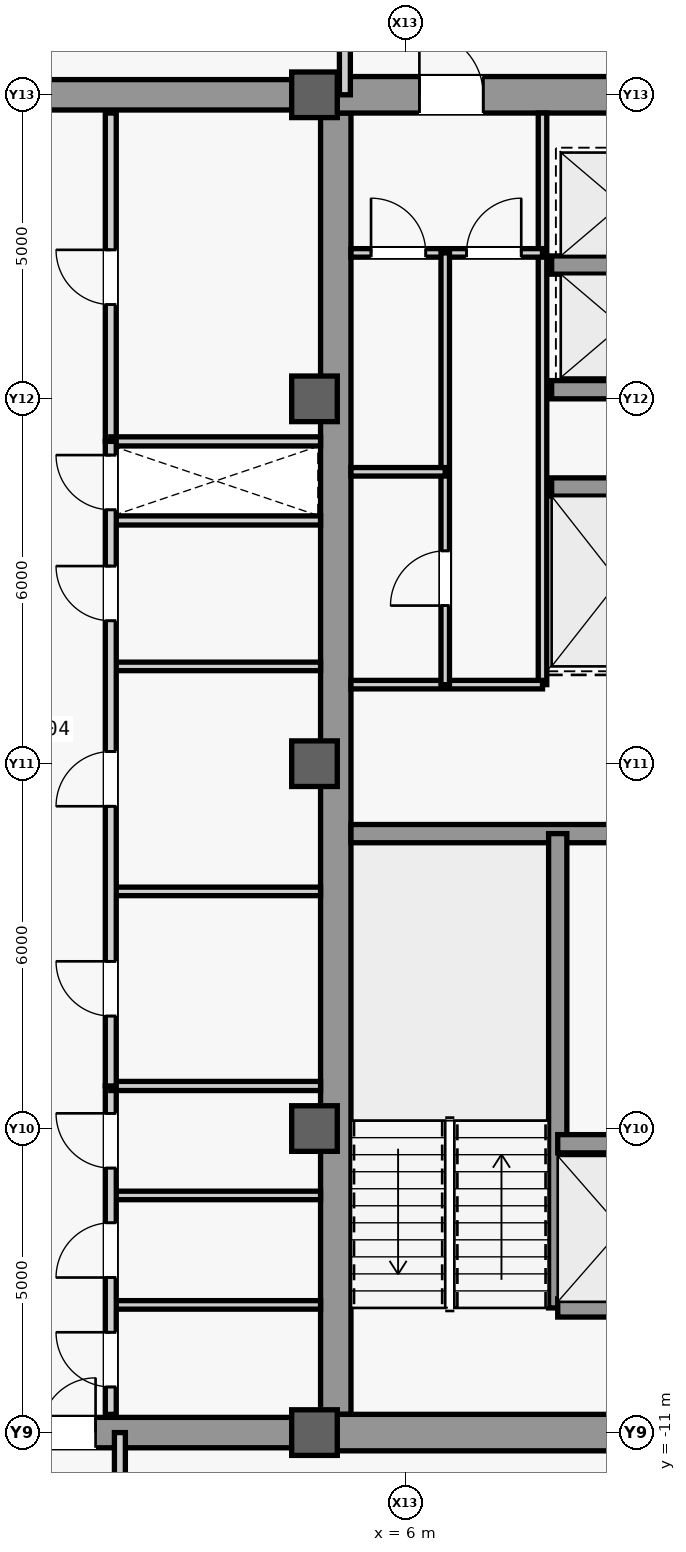
"""IFC4 building model, lengths in metres.
Left out: names, types, materials, properties, quantities, classifications, styles, units other than length and angle.
Written with IfcOpenShell. Run it as: python <this file> out.ifc"""

import sys

from ifc_helpers import new_model, si_unit, direction, frame, frame_2d, origin, origin_2d, place, context, subcontext, project, spatial, rectangle, extrude, source, transform, mapped, element, fill, save


model = new_model("IFC4")
c1 = context("Model", 3, precision=1e-05, world=origin(), true_north=direction((0.0, 1.0)))
c2 = subcontext(c1, "Body", "Model", "MODEL_VIEW")
j1 = project(units=[si_unit("LENGTHUNIT", "METRE"), si_unit("PLANEANGLEUNIT", "RADIAN")], contexts=[c1])
p1 = place(None, origin())
s1 = spatial("IfcSite", under=j1, at=p1, CompositionType="ELEMENT")
p2 = place(p1, origin())
s2 = spatial("IfcBuilding", under=s1, at=p2, CompositionType="ELEMENT")
p3 = place(p2, frame((0.0, 0.0, 273.5)))
s3 = spatial("IfcBuildingStorey", under=s2, at=p3, CompositionType="ELEMENT", Elevation=273.5)
m1 = source(origin(), c2, "Body", "SweptSolid", [
    extrude(rectangle(XDim=21.4, YDim=0.5, at=frame_2d((10.7, 0.0))), origin(), (0.0, 0.0, 1.0), 3.78),
])
p4 = place(p3, frame((4.85, -10.7, 0.0), z_axis=(0.0, 0.0, 1.0), x_axis=(0.0, 1.0, 0.0)))
e1 = element("IfcWall", 1, at=p4, inside=s3, PredefinedType="SHEAR", context=c2, shape_type="MappedRepresentation", body=[
    mapped(m1, transform((0.0, 0.0, 0.0), scale=1.0)),
])
m2 = source(origin(), c2, "Body", "SweptSolid", [
    extrude(rectangle(XDim=5.9, YDim=0.6, at=frame_2d((2.95, 0.0))), origin(), (0.0, 0.0, 1.0), 3.78),
])
p5 = place(p3, frame((4.85, -11.0, 0.0), z_axis=(0.0, 0.0, 1.0), x_axis=(1.0, 0.0, 0.0)))
e2 = element("IfcWall", 2, at=p5, inside=s3, PredefinedType="SHEAR", context=c2, shape_type="MappedRepresentation", body=[
    mapped(m2, transform((0.0, 0.0, 0.0), scale=1.0)),
])
p6 = place(p3, frame((4.85, 11.0, 0.0), z_axis=(0.0, 0.0, 1.0), x_axis=(1.0, 0.0, 0.0)))
e3 = element("IfcWall", 3, at=p6, inside=s3, PredefinedType="SHEAR", context=c2, shape_type="MappedRepresentation", body=[
    mapped(m2, transform((0.0, 0.0, 0.0), scale=1.0)),
])
m3 = source(origin(), c2, "Body", "SweptSolid", [
    extrude(rectangle(XDim=1.05, YDim=2.2, at=frame_2d((0.525, 1.1))), frame((0.0, 0.31, 0.0), z_axis=(0.0, -1.0, 0.0), x_axis=(1.0, 0.0, 0.0)), (0.0, 0.0, 1.0), 0.62),
])
p7 = place(p6, frame((1.375, 0.0, 0.0)))
e4 = element("IfcOpeningElement", 4, at=p7, cuts=e3, PredefinedType="OPENING", context=c2, shape_type="MappedRepresentation", body=[
    mapped(m3, transform((0.0, 0.0, 0.0), scale=1.0)),
])
m4 = source(origin(), c2, "Body", "SweptSolid", [
    extrude(rectangle(XDim=5.65, YDim=0.3, at=frame_2d((2.825, 0.0))), origin(), (0.0, 0.0, 1.0), 3.78),
])
p8 = place(p3, frame((5.1, -1.15, 0.0), z_axis=(0.0, 0.0, 1.0), x_axis=(1.0, 0.0, 0.0)))
e5 = element("IfcWall", 5, at=p8, inside=s3, PredefinedType="SHEAR", context=c2, shape_type="MappedRepresentation", body=[
    mapped(m4, transform((0.0, 0.0, 0.0), scale=1.0)),
])
m5 = source(origin(), c2, "Body", "SweptSolid", [
    extrude(rectangle(XDim=9.2, YDim=0.5, at=frame_2d((4.6, 0.0))), origin(), (0.0, 0.0, 1.0), 3.78),
])
p9 = place(p3, frame((-4.6, -11.0, 0.0), z_axis=(0.0, 0.0, 1.0), x_axis=(1.0, 0.0, 0.0)))
e6 = element("IfcWall", 6, at=p9, inside=s3, PredefinedType="SHEAR", context=c2, shape_type="MappedRepresentation", body=[
    mapped(m5, transform((0.0, 0.0, 0.0), scale=1.0)),
])
m6 = source(origin(), c2, "Body", "SweptSolid", [
    extrude(rectangle(XDim=1.8, YDim=2.25, at=frame_2d((0.9, 1.125))), frame((0.0, 0.26, 0.0), z_axis=(0.0, -1.0, 0.0), x_axis=(1.0, 0.0, 0.0)), (0.0, 0.0, 1.0), 0.52),
])
p10 = place(p9, frame((3.7, 0.0, 0.0)))
e7 = element("IfcOpeningElement", 7, at=p10, cuts=e6, PredefinedType="OPENING", context=c2, shape_type="MappedRepresentation", body=[
    mapped(m6, transform((0.0, 0.0, 0.0), scale=1.0)),
])
p11 = place(p3, frame((-4.6, 11.0, 0.0), z_axis=(0.0, 0.0, 1.0), x_axis=(1.0, 0.0, 0.0)))
e8 = element("IfcWall", 8, at=p11, inside=s3, PredefinedType="SHEAR", context=c2, shape_type="MappedRepresentation", body=[
    mapped(m5, transform((0.0, 0.0, 0.0), scale=1.0)),
])
m7 = source(origin(), c2, "Body", "SweptSolid", [
    extrude(rectangle(XDim=0.75, YDim=0.75, at=origin_2d()), origin(), (0.0, 0.0, 1.0), 4.0),
])
for number, where, z_axis, x_axis in (
    (9, (4.5, -11.0, 0.0), (0.0, 0.0, 1.0), (1.0, 0.0, 0.0)),
    (10, (4.5, -6.0, 0.0), (0.0, 0.0, 1.0), (1.0, 0.0, 0.0)),
    (11, (4.5, 0.0, 0.0), (0.0, 0.0, 1.0), (1.0, 0.0, 0.0)),
    (12, (4.5, 6.0, 0.0), (0.0, 0.0, 1.0), (1.0, 0.0, 0.0)),
    (13, (4.5, 11.0, 0.0), (0.0, 0.0, 1.0), (1.0, 0.0, 0.0)),
):
    element("IfcColumn", number, at=place(p3, frame(where, z_axis=z_axis, x_axis=x_axis)), inside=s3, PredefinedType="COLUMN", context=c2, shape_type="MappedRepresentation", body=[
        mapped(m7, transform((0.0, 0.0, 0.0), scale=1.0)),
    ])
m8 = source(origin(), c2, "Body", "SweptSolid", [
    extrude(rectangle(XDim=7.8, YDim=0.3, at=frame_2d((3.9, 0.0))), origin(), (0.0, 0.0, 1.0), 3.78),
])
p12 = place(p3, frame((8.5, -8.95, 0.0), z_axis=(0.0, 0.0, 1.0), x_axis=(0.0, 1.0, 0.0)))
e14 = element("IfcWall", 14, at=p12, inside=s3, PredefinedType="SHEAR", context=c2, shape_type="MappedRepresentation", body=[
    mapped(m8, transform((0.0, 0.0, 0.0), scale=1.0)),
])
m9 = source(origin(), c2, "Body", "SweptSolid", [
    extrude(rectangle(XDim=2.2, YDim=0.3, at=frame_2d((1.1, 0.0))), origin(), (0.0, 0.0, 1.0), 3.78),
])
for number, where, z_axis, x_axis in (
    (15, (8.5, -8.95, 0.0), (0.0, 0.0, 1.0), (1.0, 0.0, 0.0)),
    (16, (8.5, -6.25, 0.0), (0.0, 0.0, 1.0), (1.0, 0.0, 0.0)),
):
    element("IfcWall", number, at=place(p3, frame(where, z_axis=z_axis, x_axis=x_axis)), inside=s3, PredefinedType="SHEAR", context=c2, shape_type="MappedRepresentation", body=[
        mapped(m9, transform((0.0, 0.0, 0.0), scale=1.0)),
    ])
m10 = source(origin(), c2, "Body", "SweptSolid", [
    extrude(rectangle(XDim=2.3, YDim=0.3, at=frame_2d((1.15, 0.0))), origin(), (0.0, 0.0, 1.0), 3.78),
])
for number, where, z_axis, x_axis in (
    (17, (8.4, 4.55, 0.0), (0.0, 0.0, 1.0), (1.0, 0.0, 0.0)),
    (18, (8.4, 6.15, 0.0), (0.0, 0.0, 1.0), (1.0, 0.0, 0.0)),
    (19, (8.4, 8.2, 0.0), (0.0, 0.0, 1.0), (1.0, 0.0, 0.0)),
):
    element("IfcWall", number, at=place(p3, frame(where, z_axis=z_axis, x_axis=x_axis)), inside=s3, PredefinedType="SHEAR", context=c2, shape_type="MappedRepresentation", body=[
        mapped(m10, transform((0.0, 0.0, 0.0), scale=1.0)),
    ])
m11 = source(origin(), c2, "Body", "SweptSolid", [
    extrude(rectangle(XDim=9.4, YDim=0.14, at=frame_2d((4.7, 0.0))), origin(), (0.0, 0.0, 1.0), 3.78),
])
p13 = place(p3, frame((8.25, 1.3, 0.0), z_axis=(0.0, 0.0, 1.0), x_axis=(0.0, 1.0, 0.0)))
e20 = element("IfcWall", 20, at=p13, inside=s3, PredefinedType="PARTITIONING", context=c2, shape_type="MappedRepresentation", body=[
    mapped(m11, transform((0.0, 0.0, 0.0), scale=1.0)),
])
m12 = source(origin(), c2, "Body", "SweptSolid", [
    extrude(rectangle(XDim=3.15, YDim=0.14, at=frame_2d((1.575, 0.0))), origin(), (0.0, 0.0, 1.0), 3.78),
])
p14 = place(p3, frame((5.1, 1.3, 0.0), z_axis=(0.0, 0.0, 1.0), x_axis=(1.0, 0.0, 0.0)))
e21 = element("IfcWall", 21, at=p14, inside=s3, PredefinedType="PARTITIONING", context=c2, shape_type="MappedRepresentation", body=[
    mapped(m12, transform((0.0, 0.0, 0.0), scale=1.0)),
])
p15 = place(p3, frame((5.1, 8.4, 0.0), z_axis=(0.0, 0.0, 1.0), x_axis=(1.0, 0.0, 0.0)))
e22 = element("IfcWall", 22, at=p15, inside=s3, PredefinedType="PARTITIONING", context=c2, shape_type="MappedRepresentation", body=[
    mapped(m12, transform((0.0, 0.0, 0.0), scale=1.0)),
])
m13 = source(origin(), c2, "Body", "SweptSolid", [
    extrude(rectangle(XDim=0.9, YDim=2.15, at=frame_2d((0.45, 1.075))), frame((0.0, 0.08, 0.0), z_axis=(0.0, -1.0, 0.0), x_axis=(1.0, 0.0, 0.0)), (0.0, 0.0, 1.0), 0.16),
])
p16 = place(p15, frame((0.33, 0.0, 0.0)))
e23 = element("IfcOpeningElement", 23, at=p16, cuts=e22, PredefinedType="OPENING", context=c2, shape_type="MappedRepresentation", body=[
    mapped(m13, transform((0.0, 0.0, 0.0), scale=1.0)),
])
p17 = place(p15, frame((1.9, 0.0, 0.0)))
e24 = element("IfcOpeningElement", 24, at=p17, cuts=e22, PredefinedType="OPENING", context=c2, shape_type="MappedRepresentation", body=[
    mapped(m13, transform((0.0, 0.0, 0.0), scale=1.0)),
])
m14 = source(origin(), c2, "Body", "SweptSolid", [
    extrude(rectangle(XDim=7.1, YDim=0.14, at=frame_2d((3.55, 0.0))), origin(), (0.0, 0.0, 1.0), 3.78),
])
p18 = place(p3, frame((6.65, 1.3, 0.0), z_axis=(0.0, 0.0, 1.0), x_axis=(0.0, 1.0, 0.0)))
e25 = element("IfcWall", 25, at=p18, inside=s3, PredefinedType="PARTITIONING", context=c2, shape_type="MappedRepresentation", body=[
    mapped(m14, transform((0.0, 0.0, 0.0), scale=1.0)),
])
p19 = place(p18, frame((1.3, 0.0, 0.0)))
e26 = element("IfcOpeningElement", 26, at=p19, cuts=e25, PredefinedType="OPENING", context=c2, shape_type="MappedRepresentation", body=[
    mapped(m13, transform((0.0, 0.0, 0.0), scale=1.0)),
])
m15 = source(origin(), c2, "Body", "SweptSolid", [
    extrude(rectangle(XDim=1.55, YDim=0.14, at=frame_2d((0.775, 0.0))), origin(), (0.0, 0.0, 1.0), 3.78),
])
p20 = place(p3, frame((5.1, 4.8, 0.0), z_axis=(0.0, 0.0, 1.0), x_axis=(1.0, 0.0, 0.0)))
e27 = element("IfcWall", 27, at=p20, inside=s3, PredefinedType="PARTITIONING", context=c2, shape_type="MappedRepresentation", body=[
    mapped(m15, transform((0.0, 0.0, 0.0), scale=1.0)),
])
m16 = source(origin(), c2, "Body", "SweptSolid", [
    extrude(rectangle(XDim=3.45, YDim=0.15, at=frame_2d((1.725, 0.0))), origin(), (0.0, 0.0, 1.0), 3.78),
])
p21 = place(p3, frame((1.15, 4.0, 0.0), z_axis=(0.0, 0.0, 1.0), x_axis=(1.0, 0.0, 0.0)))
e28 = element("IfcWall", 28, at=p21, inside=s3, PredefinedType="PARTITIONING", context=c2, shape_type="MappedRepresentation", body=[
    mapped(m16, transform((0.0, 0.0, 0.0), scale=1.0)),
])
m17 = source(origin(), c2, "Body", "SweptSolid", [
    extrude(rectangle(XDim=3.45, YDim=0.14, at=frame_2d((1.725, 0.0))), origin(), (0.0, 0.0, 1.0), 3.78),
])
for number, where, z_axis, x_axis in (
    (29, (1.15, -8.9, 0.0), (0.0, 0.0, 1.0), (1.0, 0.0, 0.0)),
    (30, (1.15, -7.1, 0.0), (0.0, 0.0, 1.0), (1.0, 0.0, 0.0)),
):
    element("IfcWall", number, at=place(p3, frame(where, z_axis=z_axis, x_axis=x_axis)), inside=s3, PredefinedType="PARTITIONING", context=c2, shape_type="MappedRepresentation", body=[
        mapped(m17, transform((0.0, 0.0, 0.0), scale=1.0)),
    ])
m18 = source(origin(), c2, "Body", "SweptSolid", [
    extrude(rectangle(XDim=5.4, YDim=0.18, at=frame_2d((2.7, 0.0))), origin(), (0.0, 0.0, 1.0), 3.78),
])
p22 = place(p3, frame((1.15, -10.7, 0.0), z_axis=(0.0, 0.0, 1.0), x_axis=(0.0, 1.0, 0.0)))
e31 = element("IfcWall", 31, at=p22, inside=s3, PredefinedType="PARTITIONING", context=c2, shape_type="MappedRepresentation", body=[
    mapped(m18, transform((0.0, 0.0, 0.0), scale=1.0)),
])
m19 = source(origin(), c2, "Body", "SweptSolid", [
    extrude(rectangle(XDim=0.9, YDim=2.15, at=frame_2d((0.45, 1.075))), frame((0.0, 0.1, 0.0), z_axis=(0.0, -1.0, 0.0), x_axis=(1.0, 0.0, 0.0)), (0.0, 0.0, 1.0), 0.2),
])
p23 = place(p22, frame((0.45, 0.0, 0.0)))
e32 = element("IfcOpeningElement", 32, at=p23, cuts=e31, PredefinedType="OPENING", context=c2, shape_type="MappedRepresentation", body=[
    mapped(m19, transform((0.0, 0.0, 0.0), scale=1.0)),
])
p24 = place(p22, frame((2.25, 0.0, 0.0)))
e33 = element("IfcOpeningElement", 33, at=p24, cuts=e31, PredefinedType="OPENING", context=c2, shape_type="MappedRepresentation", body=[
    mapped(m19, transform((0.0, 0.0, 0.0), scale=1.0)),
])
p25 = place(p22, frame((4.05, 0.0, 0.0)))
e34 = element("IfcOpeningElement", 34, at=p25, cuts=e31, PredefinedType="OPENING", context=c2, shape_type="MappedRepresentation", body=[
    mapped(m19, transform((0.0, 0.0, 0.0), scale=1.0)),
])
p26 = place(p3, frame((1.15, -5.3, 0.0), z_axis=(0.0, 0.0, 1.0), x_axis=(1.0, 0.0, 0.0)))
e35 = element("IfcWall", 35, at=p26, inside=s3, PredefinedType="PARTITIONING", context=c2, shape_type="MappedRepresentation", body=[
    mapped(m16, transform((0.0, 0.0, 0.0), scale=1.0)),
])
p27 = place(p3, frame((1.15, 5.3, 0.0), z_axis=(0.0, 0.0, 1.0), x_axis=(0.0, 1.0, 0.0)))
e36 = element("IfcWall", 36, at=p27, inside=s3, PredefinedType="PARTITIONING", context=c2, shape_type="MappedRepresentation", body=[
    mapped(m18, transform((0.0, 0.0, 0.0), scale=1.0)),
])
p28 = place(p27, frame((2.25, 0.0, 0.0)))
e37 = element("IfcOpeningElement", 37, at=p28, cuts=e36, PredefinedType="OPENING", context=c2, shape_type="MappedRepresentation", body=[
    mapped(m19, transform((0.0, 0.0, 0.0), scale=1.0)),
])
p29 = place(p3, frame((1.15, 5.3, 0.0), z_axis=(0.0, 0.0, 1.0), x_axis=(1.0, 0.0, 0.0)))
e38 = element("IfcWall", 38, at=p29, inside=s3, PredefinedType="PARTITIONING", context=c2, shape_type="MappedRepresentation", body=[
    mapped(m16, transform((0.0, 0.0, 0.0), scale=1.0)),
])
for number, where, z_axis, x_axis in (
    (39, (1.15, -2.1, 0.0), (0.0, 0.0, 1.0), (1.0, 0.0, 0.0)),
    (40, (1.15, 1.6, 0.0), (0.0, 0.0, 1.0), (1.0, 0.0, 0.0)),
):
    element("IfcWall", number, at=place(p3, frame(where, z_axis=z_axis, x_axis=x_axis)), inside=s3, PredefinedType="PARTITIONING", context=c2, shape_type="MappedRepresentation", body=[
        mapped(m17, transform((0.0, 0.0, 0.0), scale=1.0)),
    ])
m20 = source(origin(), c2, "Body", "SweptSolid", [
    extrude(rectangle(XDim=10.6, YDim=0.18, at=frame_2d((5.3, 0.0))), origin(), (0.0, 0.0, 1.0), 3.78),
])
p30 = place(p3, frame((1.15, -5.3, 0.0), z_axis=(0.0, 0.0, 1.0), x_axis=(0.0, 1.0, 0.0)))
e41 = element("IfcWall", 41, at=p30, inside=s3, PredefinedType="PARTITIONING", context=c2, shape_type="MappedRepresentation", body=[
    mapped(m20, transform((0.0, 0.0, 0.0), scale=1.0)),
])
p31 = place(p30, frame((1.15, 0.0, 0.0)))
e42 = element("IfcOpeningElement", 42, at=p31, cuts=e41, PredefinedType="OPENING", context=c2, shape_type="MappedRepresentation", body=[
    mapped(m19, transform((0.0, 0.0, 0.0), scale=1.0)),
])
p32 = place(p30, frame((4.6, 0.0, 0.0)))
e43 = element("IfcOpeningElement", 43, at=p32, cuts=e41, PredefinedType="OPENING", context=c2, shape_type="MappedRepresentation", body=[
    mapped(m19, transform((0.0, 0.0, 0.0), scale=1.0)),
])
p33 = place(p30, frame((7.65, 0.0, 0.0)))
e44 = element("IfcOpeningElement", 44, at=p33, cuts=e41, PredefinedType="OPENING", context=c2, shape_type="MappedRepresentation", body=[
    mapped(m19, transform((0.0, 0.0, 0.0), scale=1.0)),
])
p34 = place(p30, frame((9.475, 0.0, 0.0)))
e45 = element("IfcOpeningElement", 45, at=p34, cuts=e41, PredefinedType="OPENING", context=c2, shape_type="MappedRepresentation", body=[
    mapped(m19, transform((0.0, 0.0, 0.0), scale=1.0)),
])
m21 = source(origin(), c2, "Body", "SweptSolid", [
    extrude(rectangle(XDim=5.3, YDim=0.18, at=frame_2d((2.65, 0.0))), origin(), (0.0, 0.0, 1.0), 3.78),
])
p35 = place(p3, frame((1.3, -16.3, 0.0), z_axis=(0.0, 0.0, 1.0), x_axis=(0.0, 1.0, 0.0)))
e46 = element("IfcWall", 46, at=p35, inside=s3, PredefinedType="PARTITIONING", context=c2, shape_type="MappedRepresentation", body=[
    mapped(m21, transform((0.0, 0.0, 0.0), scale=1.0)),
])
m22 = source(origin(), c2, "Body", "SweptSolid", [
    extrude(rectangle(XDim=2.6, YDim=0.18, at=frame_2d((1.3, 0.0))), origin(), (0.0, 0.0, 1.0), 3.78),
])
p36 = place(p3, frame((5.0, 11.0, 0.0), z_axis=(0.0, 0.0, 1.0), x_axis=(0.0, 1.0, 0.0)))
e47 = element("IfcWall", 47, at=p36, inside=s3, PredefinedType="PARTITIONING", context=c2, shape_type="MappedRepresentation", body=[
    mapped(m22, transform((0.0, 0.0, 0.0), scale=1.0)),
])
p37 = place(p36, frame((0.85, 0.0, 0.0)))
e48 = element("IfcOpeningElement", 48, at=p37, cuts=e47, PredefinedType="OPENING", context=c2, shape_type="MappedRepresentation", body=[
    mapped(m19, transform((0.0, 0.0, 0.0), scale=1.0)),
])
m23 = source(origin(), c2, "Body", "SweptSolid", [
    extrude(rectangle(XDim=1.05, YDim=2.2, at=frame_2d((0.525, 1.1))), frame((0.0, 0.025, 0.0), z_axis=(0.0, -1.0, 0.0), x_axis=(1.0, 0.0, 0.0)), (0.0, 0.0, 1.0), 0.05),
])
p38 = place(p7, origin())
e49 = element("IfcDoor", 49, at=p38, inside=s3, OperationType="SINGLE_SWING_LEFT", PredefinedType="DOOR", context=c2, shape_type="MappedRepresentation", body=[
    mapped(m23, transform((0.0, 0.0, 0.0), scale=1.0)),
])
fill(e4, e49)
m24 = source(origin(), c2, "Body", "SweptSolid", [
    extrude(rectangle(XDim=0.9, YDim=2.15, at=frame_2d((0.45, 1.075))), frame((0.0, 0.025, 0.0), z_axis=(0.0, -1.0, 0.0), x_axis=(1.0, 0.0, 0.0)), (0.0, 0.0, 1.0), 0.05),
])
p39 = place(p16, origin())
e50 = element("IfcDoor", 50, at=p39, inside=s3, OperationType="SINGLE_SWING_LEFT", PredefinedType="DOOR", context=c2, shape_type="MappedRepresentation", body=[
    mapped(m24, transform((0.0, 0.0, 0.0), scale=1.0)),
])
fill(e23, e50)
p40 = place(p17, origin())
e51 = element("IfcDoor", 51, at=p40, inside=s3, OperationType="SINGLE_SWING_RIGHT", PredefinedType="DOOR", context=c2, shape_type="MappedRepresentation", body=[
    mapped(m24, transform((0.0, 0.0, 0.0), scale=1.0)),
])
fill(e24, e51)
p41 = place(p19, origin())
e52 = element("IfcDoor", 52, at=p41, inside=s3, OperationType="SINGLE_SWING_LEFT", PredefinedType="DOOR", context=c2, shape_type="MappedRepresentation", body=[
    mapped(m24, transform((0.0, 0.0, 0.0), scale=1.0)),
])
fill(e26, e52)
p42 = place(p23, origin())
e53 = element("IfcDoor", 53, at=p42, inside=s3, OperationType="SINGLE_SWING_RIGHT", PredefinedType="DOOR", context=c2, shape_type="MappedRepresentation", body=[
    mapped(m24, transform((0.0, 0.0, 0.0), scale=1.0)),
])
fill(e32, e53)
p43 = place(p24, origin())
e54 = element("IfcDoor", 54, at=p43, inside=s3, OperationType="SINGLE_SWING_LEFT", PredefinedType="DOOR", context=c2, shape_type="MappedRepresentation", body=[
    mapped(m24, transform((0.0, 0.0, 0.0), scale=1.0)),
])
fill(e33, e54)
p44 = place(p25, origin())
e55 = element("IfcDoor", 55, at=p44, inside=s3, OperationType="SINGLE_SWING_RIGHT", PredefinedType="DOOR", context=c2, shape_type="MappedRepresentation", body=[
    mapped(m24, transform((0.0, 0.0, 0.0), scale=1.0)),
])
fill(e34, e55)
m25 = source(origin(), c2, "Body", "SweptSolid", [
    extrude(rectangle(XDim=1.8, YDim=2.25, at=frame_2d((0.9, 1.125))), frame((0.0, 0.025, 0.0), z_axis=(0.0, -1.0, 0.0), x_axis=(1.0, 0.0, 0.0)), (0.0, 0.0, 1.0), 0.05),
])
p45 = place(p10, origin())
e56 = element("IfcDoor", 56, at=p45, inside=s3, OperationType="SINGLE_SWING_LEFT", PredefinedType="DOOR", context=c2, shape_type="MappedRepresentation", body=[
    mapped(m25, transform((0.0, 0.0, 0.0), scale=1.0)),
])
fill(e7, e56)
p46 = place(p28, origin())
e57 = element("IfcDoor", 57, at=p46, inside=s3, OperationType="SINGLE_SWING_RIGHT", PredefinedType="DOOR", context=c2, shape_type="MappedRepresentation", body=[
    mapped(m24, transform((0.0, 0.0, 0.0), scale=1.0)),
])
fill(e37, e57)
p47 = place(p31, origin())
e58 = element("IfcDoor", 58, at=p47, inside=s3, OperationType="SINGLE_SWING_RIGHT", PredefinedType="DOOR", context=c2, shape_type="MappedRepresentation", body=[
    mapped(m24, transform((0.0, 0.0, 0.0), scale=1.0)),
])
fill(e42, e58)
p48 = place(p32, origin())
e59 = element("IfcDoor", 59, at=p48, inside=s3, OperationType="SINGLE_SWING_LEFT", PredefinedType="DOOR", context=c2, shape_type="MappedRepresentation", body=[
    mapped(m24, transform((0.0, 0.0, 0.0), scale=1.0)),
])
fill(e43, e59)
p49 = place(p33, origin())
e60 = element("IfcDoor", 60, at=p49, inside=s3, OperationType="SINGLE_SWING_RIGHT", PredefinedType="DOOR", context=c2, shape_type="MappedRepresentation", body=[
    mapped(m24, transform((0.0, 0.0, 0.0), scale=1.0)),
])
fill(e44, e60)
p50 = place(p34, origin())
e61 = element("IfcDoor", 61, at=p50, inside=s3, OperationType="SINGLE_SWING_RIGHT", PredefinedType="DOOR", context=c2, shape_type="MappedRepresentation", body=[
    mapped(m24, transform((0.0, 0.0, 0.0), scale=1.0)),
])
fill(e45, e61)
save(model, sys.argv[1])
